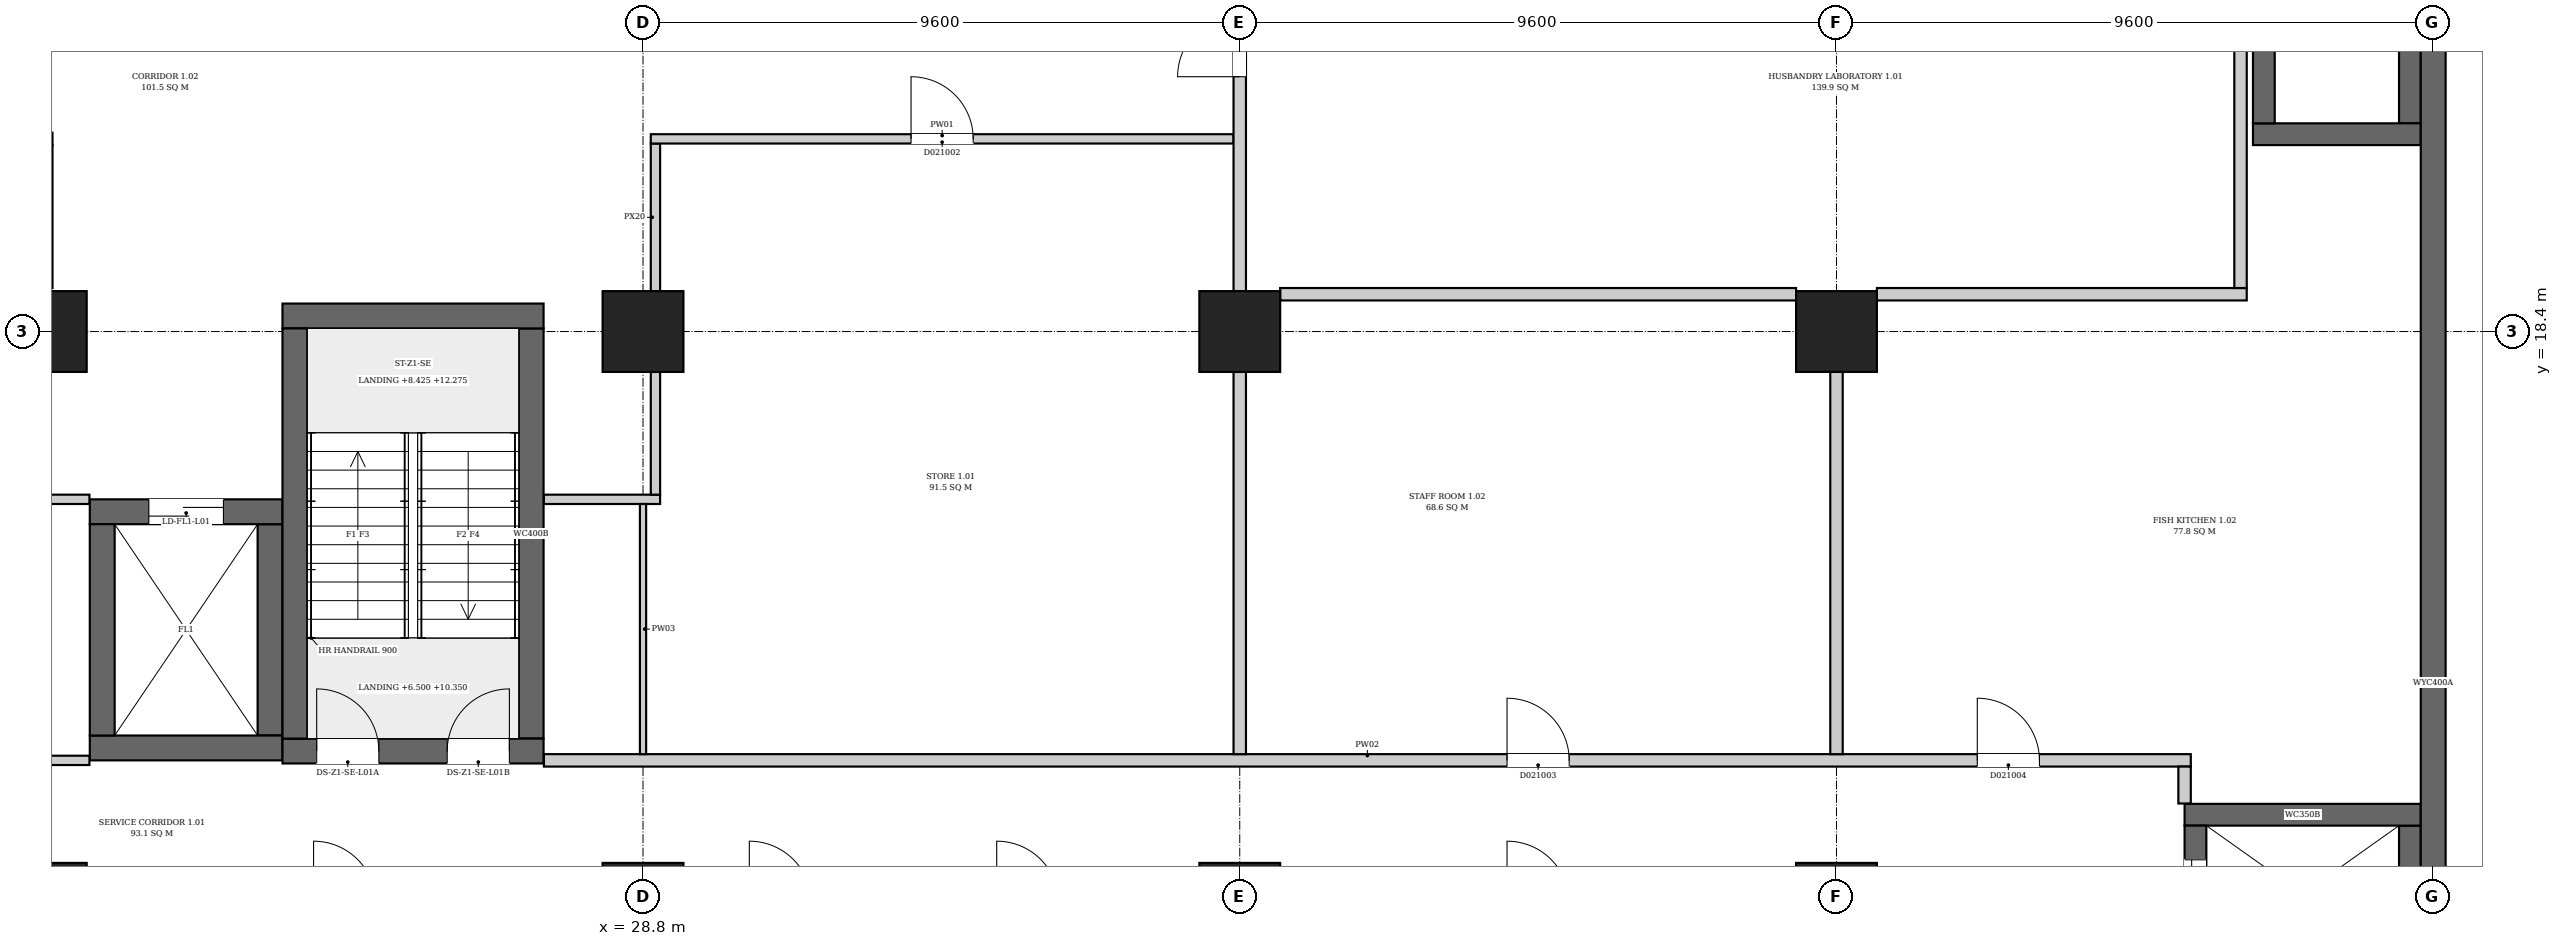
"""IFC4 building model, lengths in metres.
Left out: names, types, materials, properties, quantities, classifications, styles, units other than length and angle.
Written with IfcOpenShell. Run it as: python <this file> out.ifc"""

import sys

from ifc_helpers import new_model, si_unit, direction, frame, frame_2d, origin, origin_2d, place, context, subcontext, project, spatial, rectangle, extrude, element, fill, save


model = new_model("IFC4")
c1 = context("Model", 3, precision=1e-05, world=origin(), true_north=direction((0.0, 1.0)))
c2 = subcontext(c1, "Body", "Model", "MODEL_VIEW")
j1 = project(units=[si_unit("LENGTHUNIT", "METRE"), si_unit("PLANEANGLEUNIT", "RADIAN")], contexts=[c1])
p1 = place(None, origin())
s1 = spatial("IfcSite", under=j1, at=p1, CompositionType="ELEMENT")
p2 = place(p1, origin())
s2 = spatial("IfcBuilding", under=s1, at=p2, CompositionType="ELEMENT")
p3 = place(p2, frame((0.0, 0.0, 6.5)))
s3 = spatial("IfcBuildingStorey", under=s2, at=p3, CompositionType="ELEMENT", Elevation=6.5)
p4 = place(p3, frame((57.6, -0.2, 0.0), z_axis=(0.0, 0.0, 1.0), x_axis=(0.0, 1.0, 0.0)))
e1 = element("IfcWall", 1, at=p4, inside=s3, PredefinedType="SHEAR", context=c2, shape_type="SweptSolid", body=[
    extrude(rectangle(XDim=46.88, YDim=0.4, at=frame_2d((23.44, 0.0))), origin(), (0.0, 0.0, 1.0), 7.7),
])
p5 = place(p3, frame((23.0, 11.65, 0.0), z_axis=(0.0, 0.0, 1.0), x_axis=(1.0, 0.0, 0.0)))
e2 = element("IfcWall", 2, at=p5, inside=s3, PredefinedType="SHEAR", context=c2, shape_type="SweptSolid", body=[
    extrude(rectangle(XDim=4.2, YDim=0.4, at=frame_2d((2.1, 0.0))), origin(), (0.0, 0.0, 1.0), 7.7),
])
p6 = place(p5, frame((0.55, 0.0, 0.0)))
e3 = element("IfcOpeningElement", 3, at=p6, cuts=e2, PredefinedType="OPENING", context=c2, shape_type="SweptSolid", body=[
    extrude(rectangle(XDim=1.0, YDim=2.1, at=frame_2d((0.5, 1.05))), frame((0.0, 0.21, 0.0), z_axis=(0.0, -1.0, 0.0), x_axis=(1.0, 0.0, 0.0)), (0.0, 0.0, 1.0), 0.42),
])
p7 = place(p5, frame((2.65, 0.0, 0.0)))
e4 = element("IfcOpeningElement", 4, at=p7, cuts=e2, PredefinedType="OPENING", context=c2, shape_type="SweptSolid", body=[
    extrude(rectangle(XDim=1.0, YDim=2.1, at=frame_2d((0.5, 1.05))), frame((0.0, 0.21, 0.0), z_axis=(0.0, -1.0, 0.0), x_axis=(1.0, 0.0, 0.0)), (0.0, 0.0, 1.0), 0.42),
])
p8 = place(p3, frame((23.0, 18.65, 0.0), z_axis=(0.0, 0.0, 1.0), x_axis=(1.0, 0.0, 0.0)))
e5 = element("IfcWall", 5, at=p8, inside=s3, PredefinedType="SHEAR", context=c2, shape_type="SweptSolid", body=[
    extrude(rectangle(XDim=4.2, YDim=0.4, at=frame_2d((2.1, 0.0))), origin(), (0.0, 0.0, 1.0), 7.7),
])
for number, where, z_axis, x_axis in (
    (6, (23.2, 11.85, 0.0), (0.0, 0.0, 1.0), (0.0, 1.0, 0.0)),
    (7, (27.0, 11.85, 0.0), (0.0, 0.0, 1.0), (0.0, 1.0, 0.0)),
):
    element("IfcWall", number, at=place(p3, frame(where, z_axis=z_axis, x_axis=x_axis)), inside=s3, PredefinedType="SHEAR", context=c2, shape_type="SweptSolid", body=[
        extrude(rectangle(XDim=6.6, YDim=0.4, at=frame_2d((3.3, 0.0))), origin(), (0.0, 0.0, 1.0), 7.7),
    ])
p9 = place(p3, frame((53.6, 10.625, 0.0), z_axis=(0.0, 0.0, 1.0), x_axis=(1.0, 0.0, 0.0)))
e8 = element("IfcWall", 8, at=p9, inside=s3, PredefinedType="SHEAR", context=c2, shape_type="SweptSolid", body=[
    extrude(rectangle(XDim=3.8, YDim=0.35, at=frame_2d((1.9, 0.0))), origin(), (0.0, 0.0, 1.0), 7.7),
])
p10 = place(p3, frame((53.775, 8.25, 0.0), z_axis=(0.0, 0.0, 1.0), x_axis=(0.0, 1.0, 0.0)))
e9 = element("IfcWall", 9, at=p10, inside=s3, PredefinedType="SHEAR", context=c2, shape_type="SweptSolid", body=[
    extrude(rectangle(XDim=2.2, YDim=0.35, at=frame_2d((1.1, 0.0))), origin(), (0.0, 0.0, 1.0), 7.7),
])
p11 = place(p10, frame((0.55, 0.0, 0.0)))
e10 = element("IfcOpeningElement", 10, at=p11, cuts=e9, PredefinedType="OPENING", context=c2, shape_type="SweptSolid", body=[
    extrude(rectangle(XDim=1.1, YDim=2.1, at=frame_2d((0.55, 1.05))), frame((0.0, 0.185, 0.0), z_axis=(0.0, -1.0, 0.0), x_axis=(1.0, 0.0, 0.0)), (0.0, 0.0, 1.0), 0.37),
])
p12 = place(p3, frame((57.225, 8.25, 0.0), z_axis=(0.0, 0.0, 1.0), x_axis=(0.0, 1.0, 0.0)))
e11 = element("IfcWall", 11, at=p12, inside=s3, PredefinedType="SHEAR", context=c2, shape_type="SweptSolid", body=[
    extrude(rectangle(XDim=2.2, YDim=0.35, at=frame_2d((1.1, 0.0))), origin(), (0.0, 0.0, 1.0), 7.7),
])
p13 = place(p3, frame((54.7, 21.575, 0.0), z_axis=(0.0, 0.0, 1.0), x_axis=(1.0, 0.0, 0.0)))
e12 = element("IfcWall", 12, at=p13, inside=s3, PredefinedType="SHEAR", context=c2, shape_type="SweptSolid", body=[
    extrude(rectangle(XDim=2.7, YDim=0.35, at=frame_2d((1.35, 0.0))), origin(), (0.0, 0.0, 1.0), 7.7),
])
for number, where, z_axis, x_axis in (
    (13, (54.875, 21.75, 0.0), (0.0, 0.0, 1.0), (0.0, 1.0, 0.0)),
    (14, (57.225, 21.75, 0.0), (0.0, 0.0, 1.0), (0.0, 1.0, 0.0)),
):
    element("IfcWall", number, at=place(p3, frame(where, z_axis=z_axis, x_axis=x_axis)), inside=s3, PredefinedType="SHEAR", context=c2, shape_type="SweptSolid", body=[
        extrude(rectangle(XDim=3.5, YDim=0.35, at=frame_2d((1.75, 0.0))), origin(), (0.0, 0.0, 1.0), 7.7),
    ])
p14 = place(p3, frame((19.9, 11.7, 0.0), z_axis=(0.0, 0.0, 1.0), x_axis=(1.0, 0.0, 0.0)))
e15 = element("IfcWall", 15, at=p14, inside=s3, PredefinedType="SHEAR", context=c2, shape_type="SweptSolid", body=[
    extrude(rectangle(XDim=3.1, YDim=0.4, at=frame_2d((1.55, 0.0))), origin(), (0.0, 0.0, 1.0), 7.7),
])
p15 = place(p3, frame((19.9, 15.5, 0.0), z_axis=(0.0, 0.0, 1.0), x_axis=(1.0, 0.0, 0.0)))
e16 = element("IfcWall", 16, at=p15, inside=s3, PredefinedType="SHEAR", context=c2, shape_type="SweptSolid", body=[
    extrude(rectangle(XDim=3.1, YDim=0.4, at=frame_2d((1.55, 0.0))), origin(), (0.0, 0.0, 1.0), 7.7),
])
p16 = place(p15, frame((0.95, 0.0, 0.0)))
e17 = element("IfcOpeningElement", 17, at=p16, cuts=e16, PredefinedType="OPENING", context=c2, shape_type="SweptSolid", body=[
    extrude(rectangle(XDim=1.2, YDim=2.1, at=frame_2d((0.6, 1.05))), frame((0.0, 0.21, 0.0), z_axis=(0.0, -1.0, 0.0), x_axis=(1.0, 0.0, 0.0)), (0.0, 0.0, 1.0), 0.42),
])
for number, where, z_axis, x_axis in (
    (18, (20.1, 11.9, 0.0), (0.0, 0.0, 1.0), (0.0, 1.0, 0.0)),
    (19, (22.8, 11.9, 0.0), (0.0, 0.0, 1.0), (0.0, 1.0, 0.0)),
):
    element("IfcWall", number, at=place(p3, frame(where, z_axis=z_axis, x_axis=x_axis)), inside=s3, PredefinedType="SHEAR", context=c2, shape_type="SweptSolid", body=[
        extrude(rectangle(XDim=3.4, YDim=0.4, at=frame_2d((1.7, 0.0))), origin(), (0.0, 0.0, 1.0), 7.7),
    ])
for number, where, z_axis, x_axis in (
    (20, (19.2, 9.2, 0.0), (0.0, 0.0, 1.0), (1.0, 0.0, 0.0)),
    (21, (28.8, 9.2, 0.0), (0.0, 0.0, 1.0), (1.0, 0.0, 0.0)),
    (22, (38.4, 9.2, 0.0), (0.0, 0.0, 1.0), (1.0, 0.0, 0.0)),
    (23, (48.0, 9.2, 0.0), (0.0, 0.0, 1.0), (1.0, 0.0, 0.0)),
    (24, (19.2, 18.4, 0.0), (0.0, 0.0, 1.0), (1.0, 0.0, 0.0)),
    (25, (28.8, 18.4, 0.0), (0.0, 0.0, 1.0), (1.0, 0.0, 0.0)),
    (26, (38.4, 18.4, 0.0), (0.0, 0.0, 1.0), (1.0, 0.0, 0.0)),
    (27, (48.0, 18.4, 0.0), (0.0, 0.0, 1.0), (1.0, 0.0, 0.0)),
):
    element("IfcColumn", number, at=place(p3, frame(where, z_axis=z_axis, x_axis=x_axis)), inside=s3, PredefinedType="COLUMN", context=c2, shape_type="SweptSolid", body=[
        extrude(rectangle(XDim=1.3, YDim=1.3, at=origin_2d()), origin(), (0.0, 0.0, 1.0), 7.7),
    ])
p17 = place(p3, frame((8.9, 21.5, 0.0), z_axis=(0.0, 0.0, 1.0), x_axis=(1.0, 0.0, 0.0)))
e28 = element("IfcWall", 28, at=p17, inside=s3, PredefinedType="PARTITIONING", context=c2, shape_type="SweptSolid", body=[
    extrude(rectangle(XDim=10.4, YDim=0.2, at=frame_2d((5.2, 0.0))), origin(), (0.0, 0.0, 1.0), 7.35),
])
p18 = place(p17, frame((4.965, 0.0, 0.0)))
e29 = element("IfcOpeningElement", 29, at=p18, cuts=e28, PredefinedType="OPENING", context=c2, shape_type="SweptSolid", body=[
    extrude(rectangle(XDim=1.0, YDim=2.1, at=frame_2d((0.5, 1.05))), frame((0.0, 0.11, 0.0), z_axis=(0.0, -1.0, 0.0), x_axis=(1.0, 0.0, 0.0)), (0.0, 0.0, 1.0), 0.22),
])
p19 = place(p3, frame((10.325, 11.5, 0.0), z_axis=(0.0, 0.0, 1.0), x_axis=(1.0, 0.0, 0.0)))
e30 = element("IfcWall", 30, at=p19, inside=s3, PredefinedType="PARTITIONING", context=c2, shape_type="SweptSolid", body=[
    extrude(rectangle(XDim=9.569, YDim=0.15, at=frame_2d((4.785, 0.0))), origin(), (0.0, 0.0, 1.0), 7.35),
])
p20 = place(p3, frame((16.206, 15.7, 0.0), z_axis=(0.0, 0.0, 1.0), x_axis=(1.0, 0.0, 0.0)))
e31 = element("IfcWall", 31, at=p20, inside=s3, PredefinedType="PARTITIONING", context=c2, shape_type="SweptSolid", body=[
    extrude(rectangle(XDim=3.688, YDim=0.15, at=frame_2d((1.844, 0.0))), origin(), (0.0, 0.0, 1.0), 7.35),
])
p21 = place(p3, frame((27.206, 11.5, 0.0), z_axis=(0.0, 0.0, 1.0), x_axis=(1.0, 0.0, 0.0)))
e32 = element("IfcWall", 32, at=p21, inside=s3, PredefinedType="PARTITIONING", context=c2, shape_type="SweptSolid", body=[
    extrude(rectangle(XDim=26.494, YDim=0.2, at=frame_2d((13.247, 0.0))), origin(), (0.0, 0.0, 1.0), 7.35),
])
p22 = place(p21, frame((15.494, 0.0, 0.0)))
e33 = element("IfcOpeningElement", 33, at=p22, cuts=e32, PredefinedType="OPENING", context=c2, shape_type="SweptSolid", body=[
    extrude(rectangle(XDim=1.0, YDim=2.1, at=frame_2d((0.5, 1.05))), frame((0.0, 0.11, 0.0), z_axis=(0.0, -1.0, 0.0), x_axis=(1.0, 0.0, 0.0)), (0.0, 0.0, 1.0), 0.22),
])
p23 = place(p21, frame((23.059, 0.0, 0.0)))
e34 = element("IfcOpeningElement", 34, at=p23, cuts=e32, PredefinedType="OPENING", context=c2, shape_type="SweptSolid", body=[
    extrude(rectangle(XDim=1.0, YDim=2.1, at=frame_2d((0.5, 1.05))), frame((0.0, 0.11, 0.0), z_axis=(0.0, -1.0, 0.0), x_axis=(1.0, 0.0, 0.0)), (0.0, 0.0, 1.0), 0.22),
])
p24 = place(p3, frame((27.206, 15.7, 0.0), z_axis=(0.0, 0.0, 1.0), x_axis=(1.0, 0.0, 0.0)))
e35 = element("IfcWall", 35, at=p24, inside=s3, PredefinedType="PARTITIONING", context=c2, shape_type="SweptSolid", body=[
    extrude(rectangle(XDim=1.869, YDim=0.15, at=frame_2d((0.935, 0.0))), origin(), (0.0, 0.0, 1.0), 7.35),
])
p25 = place(p3, frame((28.8, 11.6, 0.0), z_axis=(0.0, 0.0, 1.0), x_axis=(0.0, 1.0, 0.0)))
e36 = element("IfcWall", 36, at=p25, inside=s3, PredefinedType="PARTITIONING", context=c2, shape_type="SweptSolid", body=[
    extrude(rectangle(XDim=4.025, YDim=0.1, at=frame_2d((2.012, 0.0))), origin(), (0.0, 0.0, 1.0), 6.95),
])
p26 = place(p3, frame((29.0, 15.775, 0.0), z_axis=(0.0, 0.0, 1.0), x_axis=(0.0, 1.0, 0.0)))
e37 = element("IfcWall", 37, at=p26, inside=s3, PredefinedType="PARTITIONING", context=c2, shape_type="SweptSolid", body=[
    extrude(rectangle(XDim=1.975, YDim=0.15, at=frame_2d((0.988, 0.0))), origin(), (0.0, 0.0, 1.0), 6.95),
])
p27 = place(p3, frame((29.0, 19.05, 0.0), z_axis=(0.0, 0.0, 1.0), x_axis=(0.0, 1.0, 0.0)))
e38 = element("IfcWall", 38, at=p27, inside=s3, PredefinedType="PARTITIONING", context=c2, shape_type="SweptSolid", body=[
    extrude(rectangle(XDim=2.375, YDim=0.15, at=frame_2d((1.188, 0.0))), origin(), (0.0, 0.0, 1.0), 6.95),
])
p28 = place(p3, frame((28.925, 21.5, 0.0), z_axis=(0.0, 0.0, 1.0), x_axis=(1.0, 0.0, 0.0)))
e39 = element("IfcWall", 39, at=p28, inside=s3, PredefinedType="PARTITIONING", context=c2, shape_type="SweptSolid", body=[
    extrude(rectangle(XDim=9.375, YDim=0.15, at=frame_2d((4.688, 0.0))), origin(), (0.0, 0.0, 1.0), 7.35),
])
p29 = place(p28, frame((4.187, 0.0, 0.0)))
e40 = element("IfcOpeningElement", 40, at=p29, cuts=e39, PredefinedType="OPENING", context=c2, shape_type="SweptSolid", body=[
    extrude(rectangle(XDim=1.0, YDim=2.1, at=frame_2d((0.5, 1.05))), frame((0.0, 0.085, 0.0), z_axis=(0.0, -1.0, 0.0), x_axis=(1.0, 0.0, 0.0)), (0.0, 0.0, 1.0), 0.17),
])
p30 = place(p3, frame((38.4, 11.6, 0.0), z_axis=(0.0, 0.0, 1.0), x_axis=(0.0, 1.0, 0.0)))
e41 = element("IfcWall", 41, at=p30, inside=s3, PredefinedType="PARTITIONING", context=c2, shape_type="SweptSolid", body=[
    extrude(rectangle(XDim=6.15, YDim=0.2, at=frame_2d((3.075, 0.0))), origin(), (0.0, 0.0, 1.0), 6.95),
])
p31 = place(p3, frame((38.4, 19.05, 0.0), z_axis=(0.0, 0.0, 1.0), x_axis=(0.0, 1.0, 0.0)))
e42 = element("IfcWall", 42, at=p31, inside=s3, PredefinedType="PARTITIONING", context=c2, shape_type="SweptSolid", body=[
    extrude(rectangle(XDim=7.9, YDim=0.2, at=frame_2d((3.95, 0.0))), origin(), (0.0, 0.0, 1.0), 6.95),
])
p32 = place(p31, frame((3.45, 0.0, 0.0)))
e43 = element("IfcOpeningElement", 43, at=p32, cuts=e42, PredefinedType="OPENING", context=c2, shape_type="SweptSolid", body=[
    extrude(rectangle(XDim=1.0, YDim=2.1, at=frame_2d((0.5, 1.05))), frame((0.0, 0.11, 0.0), z_axis=(0.0, -1.0, 0.0), x_axis=(1.0, 0.0, 0.0)), (0.0, 0.0, 1.0), 0.22),
])
p33 = place(p3, frame((39.05, 19.0, 0.0), z_axis=(0.0, 0.0, 1.0), x_axis=(1.0, 0.0, 0.0)))
e44 = element("IfcWall", 44, at=p33, inside=s3, PredefinedType="PARTITIONING", context=c2, shape_type="SweptSolid", body=[
    extrude(rectangle(XDim=8.3, YDim=0.2, at=frame_2d((4.15, 0.0))), origin(), (0.0, 0.0, 1.0), 7.35),
])
p34 = place(p3, frame((48.0, 11.6, 0.0), z_axis=(0.0, 0.0, 1.0), x_axis=(0.0, 1.0, 0.0)))
e45 = element("IfcWall", 45, at=p34, inside=s3, PredefinedType="PARTITIONING", context=c2, shape_type="SweptSolid", body=[
    extrude(rectangle(XDim=6.15, YDim=0.2, at=frame_2d((3.075, 0.0))), origin(), (0.0, 0.0, 1.0), 6.95),
])
p35 = place(p3, frame((48.65, 19.0, 0.0), z_axis=(0.0, 0.0, 1.0), x_axis=(1.0, 0.0, 0.0)))
e46 = element("IfcWall", 46, at=p35, inside=s3, PredefinedType="PARTITIONING", context=c2, shape_type="SweptSolid", body=[
    extrude(rectangle(XDim=5.95, YDim=0.2, at=frame_2d((2.975, 0.0))), origin(), (0.0, 0.0, 1.0), 7.35),
])
p36 = place(p3, frame((53.6, 10.806, 0.0), z_axis=(0.0, 0.0, 1.0), x_axis=(0.0, 1.0, 0.0)))
e47 = element("IfcWall", 47, at=p36, inside=s3, PredefinedType="PARTITIONING", context=c2, shape_type="SweptSolid", body=[
    extrude(rectangle(XDim=0.594, YDim=0.2, at=frame_2d((0.297, 0.0))), origin(), (0.0, 0.0, 1.0), 7.35),
])
p37 = place(p3, frame((54.5, 19.1, 0.0), z_axis=(0.0, 0.0, 1.0), x_axis=(0.0, 1.0, 0.0)))
e48 = element("IfcWall", 48, at=p37, inside=s3, PredefinedType="PARTITIONING", context=c2, shape_type="SweptSolid", body=[
    extrude(rectangle(XDim=15.35, YDim=0.2, at=frame_2d((7.675, 0.0))), origin(), (0.0, 0.0, 1.0), 7.35),
])
p38 = place(p6, origin())
e49 = element("IfcDoor", 49, at=p38, inside=s3, OperationType="SINGLE_SWING_RIGHT", PredefinedType="DOOR", context=c2, shape_type="SweptSolid", body=[
    extrude(rectangle(XDim=1.0, YDim=2.1, at=frame_2d((0.5, 1.05))), frame((0.0, 0.025, 0.0), z_axis=(0.0, -1.0, 0.0), x_axis=(1.0, 0.0, 0.0)), (0.0, 0.0, 1.0), 0.05),
])
fill(e3, e49)
p39 = place(p7, origin())
e50 = element("IfcDoor", 50, at=p39, inside=s3, OperationType="SINGLE_SWING_LEFT", PredefinedType="DOOR", context=c2, shape_type="SweptSolid", body=[
    extrude(rectangle(XDim=1.0, YDim=2.1, at=frame_2d((0.5, 1.05))), frame((0.0, 0.025, 0.0), z_axis=(0.0, -1.0, 0.0), x_axis=(1.0, 0.0, 0.0)), (0.0, 0.0, 1.0), 0.05),
])
fill(e4, e50)
p40 = place(p11, origin())
e51 = element("IfcDoor", 51, at=p40, inside=s3, OperationType="DOUBLE_DOOR_SLIDING", PredefinedType="DOOR", context=c2, shape_type="SweptSolid", body=[
    extrude(rectangle(XDim=1.1, YDim=2.1, at=frame_2d((0.55, 1.05))), frame((0.0, 0.025, 0.0), z_axis=(0.0, -1.0, 0.0), x_axis=(1.0, 0.0, 0.0)), (0.0, 0.0, 1.0), 0.05),
])
fill(e10, e51)
p41 = place(p16, origin())
e52 = element("IfcDoor", 52, at=p41, inside=s3, OperationType="DOUBLE_DOOR_SLIDING", PredefinedType="DOOR", context=c2, shape_type="SweptSolid", body=[
    extrude(rectangle(XDim=1.2, YDim=2.1, at=frame_2d((0.6, 1.05))), frame((0.0, 0.025, 0.0), z_axis=(0.0, -1.0, 0.0), x_axis=(1.0, 0.0, 0.0)), (0.0, 0.0, 1.0), 0.05),
])
fill(e17, e52)
p42 = place(p29, origin())
e53 = element("IfcDoor", 53, at=p42, inside=s3, OperationType="SINGLE_SWING_RIGHT", PredefinedType="DOOR", context=c2, shape_type="SweptSolid", body=[
    extrude(rectangle(XDim=1.0, YDim=2.1, at=frame_2d((0.5, 1.05))), frame((0.0, 0.025, 0.0), z_axis=(0.0, -1.0, 0.0), x_axis=(1.0, 0.0, 0.0)), (0.0, 0.0, 1.0), 0.05),
])
fill(e40, e53)
p43 = place(p22, origin())
e54 = element("IfcDoor", 54, at=p43, inside=s3, OperationType="SINGLE_SWING_RIGHT", PredefinedType="DOOR", context=c2, shape_type="SweptSolid", body=[
    extrude(rectangle(XDim=1.0, YDim=2.1, at=frame_2d((0.5, 1.05))), frame((0.0, 0.025, 0.0), z_axis=(0.0, -1.0, 0.0), x_axis=(1.0, 0.0, 0.0)), (0.0, 0.0, 1.0), 0.05),
])
fill(e33, e54)
p44 = place(p23, origin())
e55 = element("IfcDoor", 55, at=p44, inside=s3, OperationType="SINGLE_SWING_LEFT", PredefinedType="DOOR", context=c2, shape_type="SweptSolid", body=[
    extrude(rectangle(XDim=1.0, YDim=2.1, at=frame_2d((0.5, 1.05))), frame((0.0, 0.025, 0.0), z_axis=(0.0, -1.0, 0.0), x_axis=(1.0, 0.0, 0.0)), (0.0, 0.0, 1.0), 0.05),
])
fill(e34, e55)
p45 = place(p32, origin())
e56 = element("IfcDoor", 56, at=p45, inside=s3, OperationType="SINGLE_SWING_LEFT", PredefinedType="DOOR", context=c2, shape_type="SweptSolid", body=[
    extrude(rectangle(XDim=1.0, YDim=2.1, at=frame_2d((0.5, 1.05))), frame((0.0, 0.025, 0.0), z_axis=(0.0, -1.0, 0.0), x_axis=(1.0, 0.0, 0.0)), (0.0, 0.0, 1.0), 0.05),
])
fill(e43, e56)
save(model, sys.argv[1])
